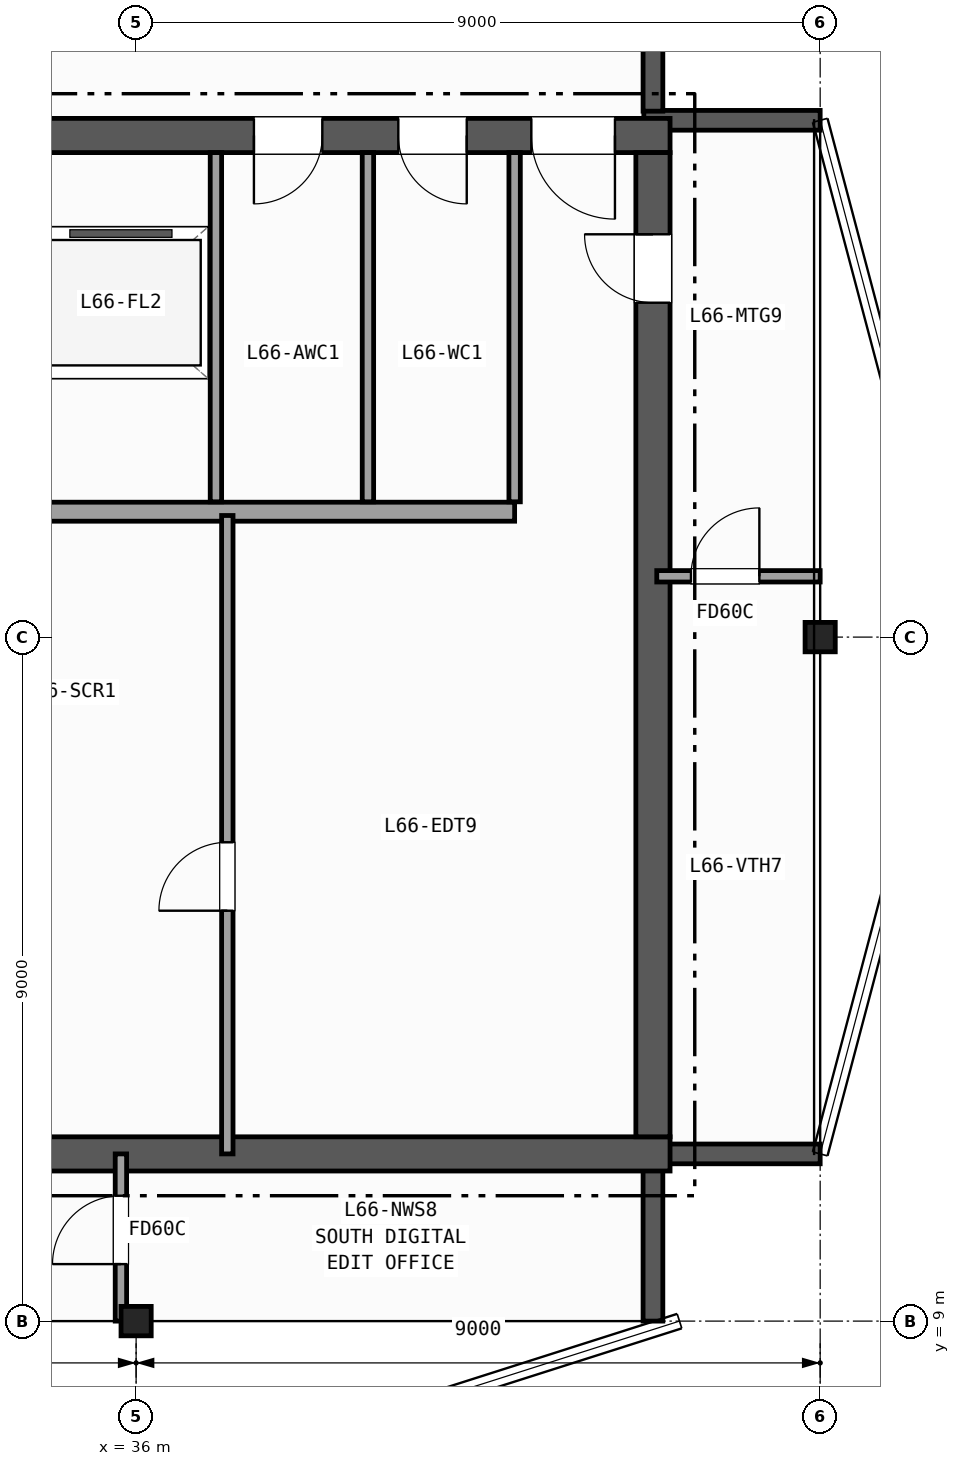
"""IFC4 building model, lengths in metres.
Left out: names, types, materials, properties, quantities, classifications, styles, units other than length and angle.
Written with IfcOpenShell. Run it as: python <this file> out.ifc"""

import sys

from ifc_helpers import new_model, si_unit, direction, frame, frame_2d, origin, origin_2d, place, context, subcontext, project, spatial, rectangle, i_section, extrude, element, fill, save


model = new_model("IFC4")
c1 = context("Model", 3, precision=1e-05, world=origin(), true_north=direction((0.0, 1.0)))
c2 = subcontext(c1, "Body", "Model", "MODEL_VIEW")
j1 = project(units=[si_unit("LENGTHUNIT", "METRE"), si_unit("PLANEANGLEUNIT", "RADIAN")], contexts=[c1])
p1 = place(None, origin())
s1 = spatial("IfcSite", under=j1, at=p1, CompositionType="ELEMENT")
p2 = place(p1, origin())
s2 = spatial("IfcBuilding", under=s1, at=p2, CompositionType="ELEMENT")
p3 = place(p2, frame((0.0, 0.0, 263.0)))
s3 = spatial("IfcBuildingStorey", under=s2, at=p3, CompositionType="ELEMENT", Elevation=263.0)
for number, where, z_axis, x_axis in (
    (1, (36.0, 9.0, 0.0), (0.0, 0.0, 1.0), (1.0, 0.0, 0.0)),
    (2, (45.0, 18.0, 0.0), (0.0, 0.0, 1.0), (1.0, 0.0, 0.0)),
):
    element("IfcColumn", number, at=place(p3, frame(where, z_axis=z_axis, x_axis=x_axis)), inside=s3, PredefinedType="COLUMN", context=c2, shape_type="SweptSolid", body=[
        extrude(i_section(OverallWidth=0.397, OverallDepth=0.387, WebThickness=0.021, FlangeThickness=0.033, FilletRadius=0.015, at=origin_2d()), origin(), (0.0, 0.0, 1.0), 3.7),
    ])
p4 = place(p3, frame((42.8, 9.0, 0.0), z_axis=(0.0, 0.0, 1.0), x_axis=(0.0, 1.0, 0.0)))
e3 = element("IfcWall", 3, at=p4, inside=s3, PredefinedType="SOLIDWALL", context=c2, shape_type="SweptSolid", body=[
    extrude(rectangle(XDim=2.08, YDim=0.26, at=frame_2d((1.04, 0.0))), origin(), (0.0, 0.0, 1.0), 3.42),
])
for number, where, z_axis, x_axis in (
    (4, (42.68, 11.2, 0.0), (0.0, 0.0, 1.0), (1.0, 0.0, 0.0)),
    (5, (45.0, 24.8, 0.0), (0.0, 0.0, 1.0), (-1.0, 0.0, 0.0)),
):
    element("IfcWall", number, at=place(p3, frame(where, z_axis=z_axis, x_axis=x_axis)), inside=s3, PredefinedType="SOLIDWALL", context=c2, shape_type="SweptSolid", body=[
        extrude(rectangle(XDim=2.32, YDim=0.26, at=frame_2d((1.16, 0.0))), origin(), (0.0, 0.0, 1.0), 3.42),
    ])
p5 = place(p3, frame((42.8, 24.92, 0.0), z_axis=(0.0, 0.0, 1.0), x_axis=(0.0, 1.0, 0.0)))
e6 = element("IfcWall", 6, at=p5, inside=s3, PredefinedType="SOLIDWALL", context=c2, shape_type="SweptSolid", body=[
    extrude(rectangle(XDim=2.08, YDim=0.26, at=frame_2d((1.04, 0.0))), origin(), (0.0, 0.0, 1.0), 3.42),
])
p6 = place(p3, frame((29.175, 11.2, 0.0), z_axis=(0.0, 0.0, 1.0), x_axis=(1.0, 0.0, 0.0)))
e7 = element("IfcWall", 7, at=p6, inside=s3, PredefinedType="SHEAR", context=c2, shape_type="SweptSolid", body=[
    extrude(rectangle(XDim=13.85, YDim=0.45, at=frame_2d((6.925, 0.0))), origin(), (0.0, 0.0, 1.0), 3.42),
])
p7 = place(p3, frame((43.025, 24.6, 0.0), z_axis=(0.0, 0.0, 1.0), x_axis=(-1.0, 0.0, 0.0)))
e8 = element("IfcWall", 8, at=p7, inside=s3, PredefinedType="SHEAR", context=c2, shape_type="SweptSolid", body=[
    extrude(rectangle(XDim=13.85, YDim=0.45, at=frame_2d((6.925, 0.0))), origin(), (0.0, 0.0, 1.0), 3.42),
])
p8 = place(p7, frame((0.725, 0.0, 0.0)))
e9 = element("IfcOpeningElement", 9, at=p8, cuts=e8, PredefinedType="OPENING", context=c2, shape_type="SweptSolid", body=[
    extrude(rectangle(XDim=1.1, YDim=2.15, at=frame_2d((0.55, 1.075))), frame((0.0, 0.235, 0.0), z_axis=(0.0, -1.0, 0.0), x_axis=(1.0, 0.0, 0.0)), (0.0, 0.0, 1.0), 0.47),
])
p9 = place(p7, frame((2.675, 0.0, 0.0)))
e10 = element("IfcOpeningElement", 10, at=p9, cuts=e8, PredefinedType="OPENING", context=c2, shape_type="SweptSolid", body=[
    extrude(rectangle(XDim=0.9, YDim=2.1, at=frame_2d((0.45, 1.05))), frame((0.0, 0.235, 0.0), z_axis=(0.0, -1.0, 0.0), x_axis=(1.0, 0.0, 0.0)), (0.0, 0.0, 1.0), 0.47),
])
p10 = place(p7, frame((4.575, 0.0, 0.0)))
e11 = element("IfcOpeningElement", 11, at=p10, cuts=e8, PredefinedType="OPENING", context=c2, shape_type="SweptSolid", body=[
    extrude(rectangle(XDim=0.9, YDim=2.1, at=frame_2d((0.45, 1.05))), frame((0.0, 0.235, 0.0), z_axis=(0.0, -1.0, 0.0), x_axis=(1.0, 0.0, 0.0)), (0.0, 0.0, 1.0), 0.47),
])
p11 = place(p3, frame((42.8, 11.425, 0.0), z_axis=(0.0, 0.0, 1.0), x_axis=(0.0, 1.0, 0.0)))
e12 = element("IfcWall", 12, at=p11, inside=s3, PredefinedType="SHEAR", context=c2, shape_type="SweptSolid", body=[
    extrude(rectangle(XDim=12.95, YDim=0.45, at=frame_2d((6.475, 0.0))), origin(), (0.0, 0.0, 1.0), 3.42),
])
p12 = place(p11, frame((10.975, 0.0, 0.0)))
e13 = element("IfcOpeningElement", 13, at=p12, cuts=e12, PredefinedType="OPENING", context=c2, shape_type="SweptSolid", body=[
    extrude(rectangle(XDim=0.9, YDim=2.1, at=frame_2d((0.45, 1.05))), frame((0.0, 0.235, 0.0), z_axis=(0.0, -1.0, 0.0), x_axis=(1.0, 0.0, 0.0)), (0.0, 0.0, 1.0), 0.47),
])
p13 = place(p3, frame((34.5, 19.65, 0.0), z_axis=(0.0, 0.0, 1.0), x_axis=(1.0, 0.0, 0.0)))
e14 = element("IfcWall", 14, at=p13, inside=s3, PredefinedType="PARTITIONING", context=c2, shape_type="SweptSolid", body=[
    extrude(rectangle(XDim=6.48, YDim=0.25, at=frame_2d((3.24, 0.0))), origin(), (0.0, 0.0, 1.0), 3.42),
])
p14 = place(p3, frame((37.2, 11.2, 0.0), z_axis=(0.0, 0.0, 1.0), x_axis=(0.0, 1.0, 0.0)))
e15 = element("IfcWall", 15, at=p14, inside=s3, PredefinedType="PARTITIONING", context=c2, shape_type="SweptSolid", body=[
    extrude(rectangle(XDim=8.4, YDim=0.15, at=frame_2d((4.2, 0.0))), origin(), (0.0, 0.0, 1.0), 3.42),
])
p15 = place(p14, frame((3.2, 0.0, 0.0)))
e16 = element("IfcOpeningElement", 16, at=p15, cuts=e15, PredefinedType="OPENING", context=c2, shape_type="SweptSolid", body=[
    extrude(rectangle(XDim=0.9, YDim=2.1, at=frame_2d((0.45, 1.05))), frame((0.0, 0.085, 0.0), z_axis=(0.0, -1.0, 0.0), x_axis=(1.0, 0.0, 0.0)), (0.0, 0.0, 1.0), 0.17),
])
for number, where, z_axis, x_axis in (
    (17, (37.05, 19.78, 0.0), (0.0, 0.0, 1.0), (0.0, 1.0, 0.0)),
    (18, (39.05, 19.78, 0.0), (0.0, 0.0, 1.0), (0.0, 1.0, 0.0)),
    (19, (40.98, 19.78, 0.0), (0.0, 0.0, 1.0), (0.0, 1.0, 0.0)),
):
    element("IfcWall", number, at=place(p3, frame(where, z_axis=z_axis, x_axis=x_axis)), inside=s3, PredefinedType="PARTITIONING", context=c2, shape_type="SweptSolid", body=[
        extrude(rectangle(XDim=4.595, YDim=0.15, at=frame_2d((2.297, 0.0))), origin(), (0.0, 0.0, 1.0), 3.42),
    ])
p16 = place(p3, frame((35.8, 9.0, 0.0), z_axis=(0.0, 0.0, 1.0), x_axis=(0.0, 1.0, 0.0)))
e20 = element("IfcWall", 20, at=p16, inside=s3, PredefinedType="PARTITIONING", context=c2, shape_type="SweptSolid", body=[
    extrude(rectangle(XDim=2.2, YDim=0.15, at=frame_2d((1.1, 0.0))), origin(), (0.0, 0.0, 1.0), 2.707),
])
p17 = place(p16, frame((0.75, 0.0, 0.0)))
e21 = element("IfcOpeningElement", 21, at=p17, cuts=e20, PredefinedType="OPENING", context=c2, shape_type="SweptSolid", body=[
    extrude(rectangle(XDim=0.9, YDim=2.1, at=frame_2d((0.45, 1.05))), frame((0.0, 0.085, 0.0), z_axis=(0.0, -1.0, 0.0), x_axis=(1.0, 0.0, 0.0)), (0.0, 0.0, 1.0), 0.17),
])
p18 = place(p3, frame((42.85, 18.8, 0.0), z_axis=(0.0, 0.0, 1.0), x_axis=(1.0, 0.0, 0.0)))
e22 = element("IfcWall", 22, at=p18, inside=s3, PredefinedType="PARTITIONING", context=c2, shape_type="SweptSolid", body=[
    extrude(rectangle(XDim=2.15, YDim=0.15, at=frame_2d((1.075, 0.0))), origin(), (0.0, 0.0, 1.0), 3.42),
])
p19 = place(p18, frame((0.45, 0.0, 0.0)))
e23 = element("IfcOpeningElement", 23, at=p19, cuts=e22, PredefinedType="OPENING", context=c2, shape_type="SweptSolid", body=[
    extrude(rectangle(XDim=0.9, YDim=2.1, at=frame_2d((0.45, 1.05))), frame((0.0, 0.085, 0.0), z_axis=(0.0, -1.0, 0.0), x_axis=(1.0, 0.0, 0.0)), (0.0, 0.0, 1.0), 0.17),
])
p20 = place(p12, origin())
e24 = element("IfcDoor", 24, at=p20, inside=s3, OperationType="SINGLE_SWING_RIGHT", PredefinedType="DOOR", context=c2, shape_type="SweptSolid", body=[
    extrude(rectangle(XDim=0.9, YDim=2.1, at=frame_2d((0.45, 1.05))), frame((0.0, 0.025, 0.0), z_axis=(0.0, -1.0, 0.0), x_axis=(1.0, 0.0, 0.0)), (0.0, 0.0, 1.0), 0.05),
])
fill(e13, e24)
p21 = place(p8, origin())
e25 = element("IfcDoor", 25, at=p21, inside=s3, OperationType="SINGLE_SWING_LEFT", PredefinedType="DOOR", context=c2, shape_type="SweptSolid", body=[
    extrude(rectangle(XDim=1.1, YDim=2.15, at=frame_2d((0.55, 1.075))), frame((0.0, 0.025, 0.0), z_axis=(0.0, -1.0, 0.0), x_axis=(1.0, 0.0, 0.0)), (0.0, 0.0, 1.0), 0.05),
])
fill(e9, e25)
p22 = place(p9, origin())
e26 = element("IfcDoor", 26, at=p22, inside=s3, OperationType="SINGLE_SWING_LEFT", PredefinedType="DOOR", context=c2, shape_type="SweptSolid", body=[
    extrude(rectangle(XDim=0.9, YDim=2.1, at=frame_2d((0.45, 1.05))), frame((0.0, 0.025, 0.0), z_axis=(0.0, -1.0, 0.0), x_axis=(1.0, 0.0, 0.0)), (0.0, 0.0, 1.0), 0.05),
])
fill(e10, e26)
p23 = place(p10, origin())
e27 = element("IfcDoor", 27, at=p23, inside=s3, OperationType="SINGLE_SWING_RIGHT", PredefinedType="DOOR", context=c2, shape_type="SweptSolid", body=[
    extrude(rectangle(XDim=0.9, YDim=2.1, at=frame_2d((0.45, 1.05))), frame((0.0, 0.025, 0.0), z_axis=(0.0, -1.0, 0.0), x_axis=(1.0, 0.0, 0.0)), (0.0, 0.0, 1.0), 0.05),
])
fill(e11, e27)
p24 = place(p15, origin())
e28 = element("IfcDoor", 28, at=p24, inside=s3, OperationType="SINGLE_SWING_LEFT", PredefinedType="DOOR", context=c2, shape_type="SweptSolid", body=[
    extrude(rectangle(XDim=0.9, YDim=2.1, at=frame_2d((0.45, 1.05))), frame((0.0, 0.025, 0.0), z_axis=(0.0, -1.0, 0.0), x_axis=(1.0, 0.0, 0.0)), (0.0, 0.0, 1.0), 0.05),
])
fill(e16, e28)
p25 = place(p17, origin())
e29 = element("IfcDoor", 29, at=p25, inside=s3, OperationType="SINGLE_SWING_LEFT", PredefinedType="DOOR", context=c2, shape_type="SweptSolid", body=[
    extrude(rectangle(XDim=0.9, YDim=2.1, at=frame_2d((0.45, 1.05))), frame((0.0, 0.025, 0.0), z_axis=(0.0, -1.0, 0.0), x_axis=(1.0, 0.0, 0.0)), (0.0, 0.0, 1.0), 0.05),
])
fill(e21, e29)
p26 = place(p19, origin())
e30 = element("IfcDoor", 30, at=p26, inside=s3, OperationType="SINGLE_SWING_RIGHT", PredefinedType="DOOR", context=c2, shape_type="SweptSolid", body=[
    extrude(rectangle(XDim=0.9, YDim=2.1, at=frame_2d((0.45, 1.05))), frame((0.0, 0.025, 0.0), z_axis=(0.0, -1.0, 0.0), x_axis=(1.0, 0.0, 0.0)), (0.0, 0.0, 1.0), 0.05),
])
fill(e23, e30)
save(model, sys.argv[1])
